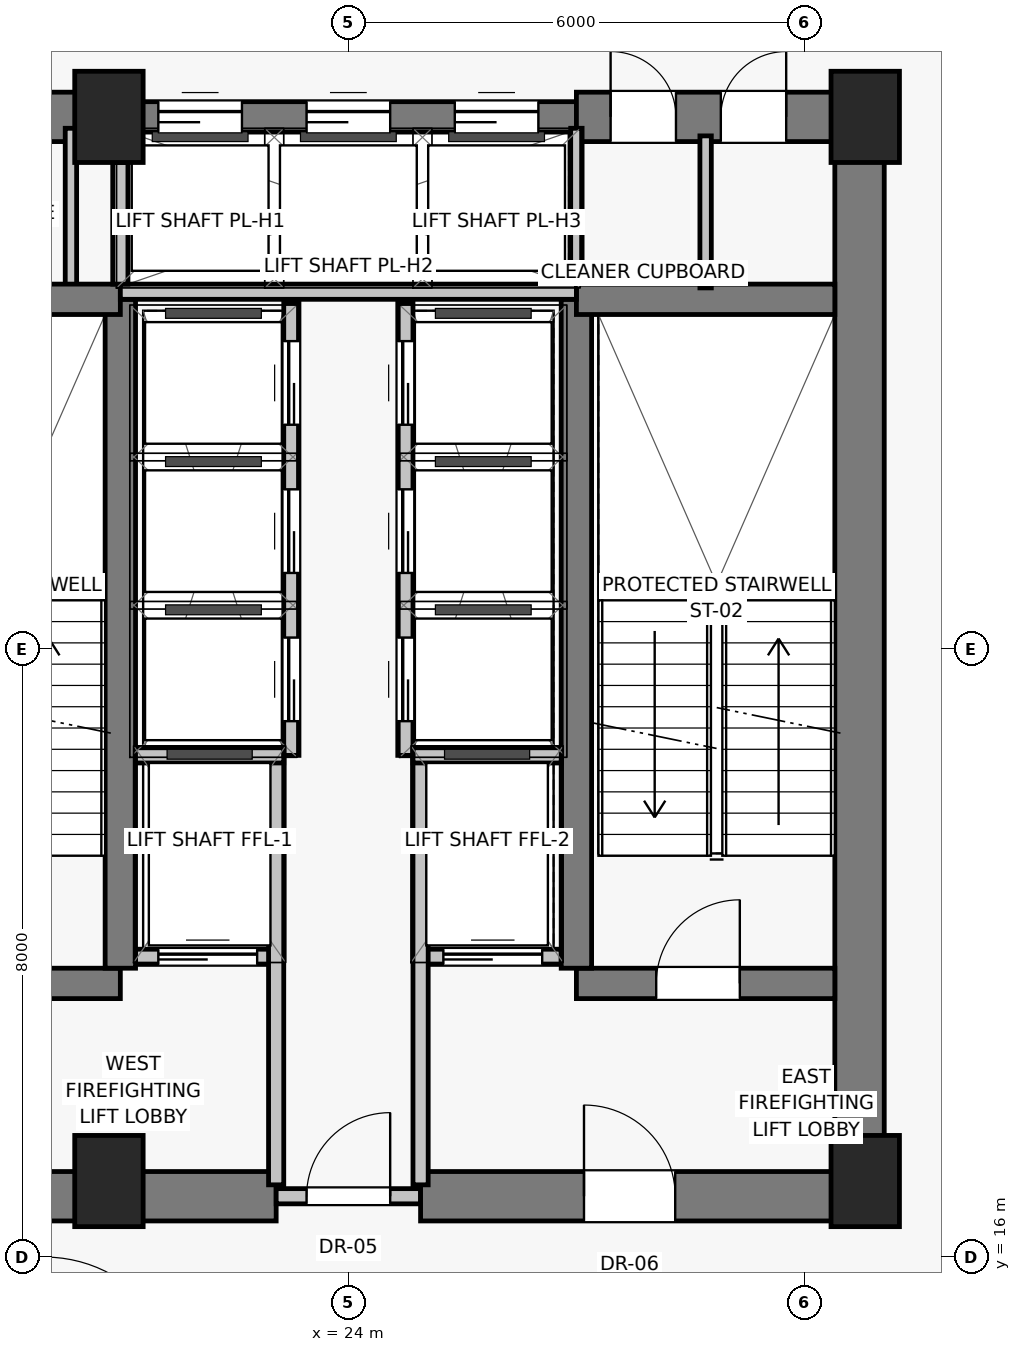
"""IFC4 building model, lengths in metres.
Left out: names, types, materials, properties, quantities, classifications, styles, units other than length and angle.
Written with IfcOpenShell. Run it as: python <this file> out.ifc"""

import sys

from ifc_helpers import new_model, si_unit, direction, frame, frame_2d, origin, origin_2d, place, context, subcontext, project, spatial, rectangle, extrude, source, transform, mapped, element, fill, save


model = new_model("IFC4")
c1 = context("Model", 3, precision=1e-05, world=origin(), true_north=direction((0.0, 1.0)))
c2 = subcontext(c1, "Body", "Model", "MODEL_VIEW")
j1 = project(units=[si_unit("LENGTHUNIT", "METRE"), si_unit("PLANEANGLEUNIT", "RADIAN")], contexts=[c1])
p1 = place(None, origin())
s1 = spatial("IfcSite", under=j1, at=p1, CompositionType="ELEMENT")
p2 = place(p1, origin())
s2 = spatial("IfcBuilding", under=s1, at=p2, CompositionType="ELEMENT")
p3 = place(p2, frame((0.0, 0.0, 85.15)))
s3 = spatial("IfcBuildingStorey", under=s2, at=p3, CompositionType="ELEMENT", Elevation=85.15)
for number, where, z_axis, x_axis in (
    (1, (20.85, 17.0, 0.0), (0.0, 0.0, 1.0), (1.0, 0.0, 0.0)),
    (2, (30.8, 17.0, 0.0), (0.0, 0.0, 1.0), (1.0, 0.0, 0.0)),
    (3, (20.85, 31.0, 0.0), (0.0, 0.0, 1.0), (1.0, 0.0, 0.0)),
    (4, (30.8, 31.0, 0.0), (0.0, 0.0, 1.0), (1.0, 0.0, 0.0)),
):
    element("IfcColumn", number, at=place(p3, frame(where, z_axis=z_axis, x_axis=x_axis)), inside=s3, PredefinedType="PILASTER", context=c2, shape_type="SweptSolid", body=[
        extrude(rectangle(XDim=0.9, YDim=1.2, at=origin_2d()), origin(), (0.0, 0.0, 1.0), 4.3),
    ])
p4 = place(p3, frame((30.725, 16.8, 0.0), z_axis=(0.0, 0.0, 1.0), x_axis=(0.0, 1.0, 0.0)))
e5 = element("IfcWall", 5, at=p4, inside=s3, PredefinedType="SHEAR", context=c2, shape_type="SweptSolid", body=[
    extrude(rectangle(XDim=14.2, YDim=0.65, at=frame_2d((7.1, 0.0))), origin(), (0.0, 0.0, 1.0), 4.05),
])
p5 = place(p3, frame((17.2, 16.8, 0.0), z_axis=(0.0, 0.0, 1.0), x_axis=(1.0, 0.0, 0.0)))
e6 = element("IfcWall", 6, at=p5, inside=s3, PredefinedType="SHEAR", context=c2, shape_type="SweptSolid", body=[
    extrude(rectangle(XDim=5.85, YDim=0.65, at=frame_2d((2.925, 0.0))), origin(), (0.0, 0.0, 1.0), 4.05),
])
p6 = place(p5, frame((1.15, 0.0, 0.0)))
e7 = element("IfcOpeningElement", 7, at=p6, cuts=e6, PredefinedType="OPENING", context=c2, shape_type="SweptSolid", body=[
    extrude(rectangle(XDim=1.2, YDim=2.03, at=frame_2d((0.6, 1.015))), frame((0.0, 0.335, 0.0), z_axis=(0.0, -1.0, 0.0), x_axis=(1.0, 0.0, 0.0)), (0.0, 0.0, 1.0), 0.67),
])
p7 = place(p3, frame((23.05, 16.8, 0.0), z_axis=(0.0, 0.0, 1.0), x_axis=(1.0, 0.0, 0.0)))
e8 = element("IfcWall", 8, at=p7, inside=s3, PredefinedType="SOLIDWALL", context=c2, shape_type="SweptSolid", body=[
    extrude(rectangle(XDim=1.9, YDim=0.2, at=frame_2d((0.95, 0.0))), origin(), (0.0, 0.0, 1.0), 3.2),
])
p8 = place(p7, frame((0.4, 0.0, 0.0)))
e9 = element("IfcOpeningElement", 9, at=p8, cuts=e8, PredefinedType="OPENING", context=c2, shape_type="SweptSolid", body=[
    extrude(rectangle(XDim=1.1, YDim=2.03, at=frame_2d((0.55, 1.015))), frame((0.0, 0.11, 0.0), z_axis=(0.0, -1.0, 0.0), x_axis=(1.0, 0.0, 0.0)), (0.0, 0.0, 1.0), 0.22),
])
p9 = place(p3, frame((24.95, 16.8, 0.0), z_axis=(0.0, 0.0, 1.0), x_axis=(1.0, 0.0, 0.0)))
e10 = element("IfcWall", 10, at=p9, inside=s3, PredefinedType="SHEAR", context=c2, shape_type="SweptSolid", body=[
    extrude(rectangle(XDim=5.85, YDim=0.65, at=frame_2d((2.925, 0.0))), origin(), (0.0, 0.0, 1.0), 4.05),
])
p10 = place(p9, frame((2.15, 0.0, 0.0)))
e11 = element("IfcOpeningElement", 11, at=p10, cuts=e10, PredefinedType="OPENING", context=c2, shape_type="SweptSolid", body=[
    extrude(rectangle(XDim=1.2, YDim=2.03, at=frame_2d((0.6, 1.015))), frame((0.0, 0.335, 0.0), z_axis=(0.0, -1.0, 0.0), x_axis=(1.0, 0.0, 0.0)), (0.0, 0.0, 1.0), 0.67),
])
p11 = place(p3, frame((17.2, 31.0, 0.0), z_axis=(0.0, 0.0, 1.0), x_axis=(1.0, 0.0, 0.0)))
e12 = element("IfcWall", 12, at=p11, inside=s3, PredefinedType="SHEAR", context=c2, shape_type="SweptSolid", body=[
    extrude(rectangle(XDim=3.8, YDim=0.65, at=frame_2d((1.9, 0.0))), origin(), (0.0, 0.0, 1.0), 4.05),
])
p12 = place(p11, frame((1.25, 0.0, 0.0)))
e13 = element("IfcOpeningElement", 13, at=p12, cuts=e12, PredefinedType="OPENING", context=c2, shape_type="SweptSolid", body=[
    extrude(rectangle(XDim=0.86, YDim=2.01, at=frame_2d((0.43, 1.005))), frame((0.0, 0.335, 0.0), z_axis=(0.0, -1.0, 0.0), x_axis=(1.0, 0.0, 0.0)), (0.0, 0.0, 1.0), 0.67),
])
p13 = place(p3, frame((21.0, 31.0, 0.0), z_axis=(0.0, 0.0, 1.0), x_axis=(1.0, 0.0, 0.0)))
e14 = element("IfcWall", 14, at=p13, inside=s3, PredefinedType="SHEAR", context=c2, shape_type="SweptSolid", body=[
    extrude(rectangle(XDim=6.0, YDim=0.4, at=frame_2d((3.0, 0.0))), origin(), (0.0, 0.0, 1.0), 4.05),
])
p14 = place(p13, frame((0.5, 0.0, 0.0)))
e15 = element("IfcOpeningElement", 15, at=p14, cuts=e14, PredefinedType="OPENING", context=c2, shape_type="SweptSolid", body=[
    extrude(rectangle(XDim=1.1, YDim=2.08, at=frame_2d((0.55, 1.04))), frame((0.0, 0.21, 0.0), z_axis=(0.0, -1.0, 0.0), x_axis=(1.0, 0.0, 0.0)), (0.0, 0.0, 1.0), 0.42),
])
p15 = place(p13, frame((2.45, 0.0, 0.0)))
e16 = element("IfcOpeningElement", 16, at=p15, cuts=e14, PredefinedType="OPENING", context=c2, shape_type="SweptSolid", body=[
    extrude(rectangle(XDim=1.1, YDim=2.08, at=frame_2d((0.55, 1.04))), frame((0.0, 0.21, 0.0), z_axis=(0.0, -1.0, 0.0), x_axis=(1.0, 0.0, 0.0)), (0.0, 0.0, 1.0), 0.42),
])
p16 = place(p13, frame((4.4, 0.0, 0.0)))
e17 = element("IfcOpeningElement", 17, at=p16, cuts=e14, PredefinedType="OPENING", context=c2, shape_type="SweptSolid", body=[
    extrude(rectangle(XDim=1.1, YDim=2.08, at=frame_2d((0.55, 1.04))), frame((0.0, 0.21, 0.0), z_axis=(0.0, -1.0, 0.0), x_axis=(1.0, 0.0, 0.0)), (0.0, 0.0, 1.0), 0.42),
])
p17 = place(p3, frame((27.0, 31.0, 0.0), z_axis=(0.0, 0.0, 1.0), x_axis=(1.0, 0.0, 0.0)))
e18 = element("IfcWall", 18, at=p17, inside=s3, PredefinedType="SHEAR", context=c2, shape_type="SweptSolid", body=[
    extrude(rectangle(XDim=3.8, YDim=0.65, at=frame_2d((1.9, 0.0))), origin(), (0.0, 0.0, 1.0), 4.05),
])
p18 = place(p17, frame((0.45, 0.0, 0.0)))
e19 = element("IfcOpeningElement", 19, at=p18, cuts=e18, PredefinedType="OPENING", context=c2, shape_type="SweptSolid", body=[
    extrude(rectangle(XDim=0.86, YDim=2.01, at=frame_2d((0.43, 1.005))), frame((0.0, 0.335, 0.0), z_axis=(0.0, -1.0, 0.0), x_axis=(1.0, 0.0, 0.0)), (0.0, 0.0, 1.0), 0.67),
])
p19 = place(p17, frame((1.9, 0.0, 0.0)))
e20 = element("IfcOpeningElement", 20, at=p19, cuts=e18, PredefinedType="OPENING", context=c2, shape_type="SweptSolid", body=[
    extrude(rectangle(XDim=0.86, YDim=2.01, at=frame_2d((0.43, 1.005))), frame((0.0, 0.335, 0.0), z_axis=(0.0, -1.0, 0.0), x_axis=(1.0, 0.0, 0.0)), (0.0, 0.0, 1.0), 0.67),
])
for number, where, z_axis, x_axis in (
    (21, (20.35, 28.65, 0.0), (0.0, 0.0, 1.0), (0.0, 1.0, 0.0)),
    (22, (27.0, 28.65, 0.0), (0.0, 0.0, 1.0), (0.0, 1.0, 0.0)),
):
    element("IfcWall", number, at=place(p3, frame(where, z_axis=z_axis, x_axis=x_axis)), inside=s3, PredefinedType="PARTITIONING", context=c2, shape_type="SweptSolid", body=[
        extrude(rectangle(XDim=2.2, YDim=0.15, at=frame_2d((1.1, 0.0))), origin(), (0.0, 0.0, 1.0), 4.05),
    ])
p20 = place(p3, frame((17.6, 19.6, 0.0), z_axis=(0.0, 0.0, 1.0), x_axis=(1.0, 0.0, 0.0)))
e23 = element("IfcWall", 23, at=p20, inside=s3, PredefinedType="SHEAR", context=c2, shape_type="SweptSolid", body=[
    extrude(rectangle(XDim=3.4, YDim=0.4, at=frame_2d((1.7, 0.0))), origin(), (0.0, 0.0, 1.0), 4.05),
])
p21 = place(p20, frame((1.05, 0.0, 0.0)))
e24 = element("IfcOpeningElement", 24, at=p21, cuts=e23, PredefinedType="OPENING", context=c2, shape_type="SweptSolid", body=[
    extrude(rectangle(XDim=1.1, YDim=2.03, at=frame_2d((0.55, 1.015))), frame((0.0, 0.21, 0.0), z_axis=(0.0, -1.0, 0.0), x_axis=(1.0, 0.0, 0.0)), (0.0, 0.0, 1.0), 0.42),
])
p22 = place(p3, frame((21.2, 19.95, 0.0), z_axis=(0.0, 0.0, 1.0), x_axis=(1.0, 0.0, 0.0)))
e25 = element("IfcWall", 25, at=p22, inside=s3, PredefinedType="SOLIDWALL", context=c2, shape_type="SweptSolid", body=[
    extrude(rectangle(XDim=1.85, YDim=0.2, at=frame_2d((0.925, 0.0))), origin(), (0.0, 0.0, 1.0), 4.05),
])
p23 = place(p22, frame((0.3, 0.0, 0.0)))
e26 = element("IfcOpeningElement", 26, at=p23, cuts=e25, PredefinedType="OPENING", context=c2, shape_type="SweptSolid", body=[
    extrude(rectangle(XDim=1.3, YDim=2.25, at=frame_2d((0.65, 1.125))), frame((0.0, 0.11, 0.0), z_axis=(0.0, -1.0, 0.0), x_axis=(1.0, 0.0, 0.0)), (0.0, 0.0, 1.0), 0.22),
])
p24 = place(p3, frame((24.95, 19.95, 0.0), z_axis=(0.0, 0.0, 1.0), x_axis=(1.0, 0.0, 0.0)))
e27 = element("IfcWall", 27, at=p24, inside=s3, PredefinedType="SOLIDWALL", context=c2, shape_type="SweptSolid", body=[
    extrude(rectangle(XDim=1.85, YDim=0.2, at=frame_2d((0.925, 0.0))), origin(), (0.0, 0.0, 1.0), 4.05),
])
p25 = place(p24, frame((0.3, 0.0, 0.0)))
e28 = element("IfcOpeningElement", 28, at=p25, cuts=e27, PredefinedType="OPENING", context=c2, shape_type="SweptSolid", body=[
    extrude(rectangle(XDim=1.3, YDim=2.25, at=frame_2d((0.65, 1.125))), frame((0.0, 0.11, 0.0), z_axis=(0.0, -1.0, 0.0), x_axis=(1.0, 0.0, 0.0)), (0.0, 0.0, 1.0), 0.22),
])
p26 = place(p3, frame((27.0, 19.6, 0.0), z_axis=(0.0, 0.0, 1.0), x_axis=(1.0, 0.0, 0.0)))
e29 = element("IfcWall", 29, at=p26, inside=s3, PredefinedType="SHEAR", context=c2, shape_type="SweptSolid", body=[
    extrude(rectangle(XDim=3.4, YDim=0.4, at=frame_2d((1.7, 0.0))), origin(), (0.0, 0.0, 1.0), 4.05),
])
p27 = place(p26, frame((1.05, 0.0, 0.0)))
e30 = element("IfcOpeningElement", 30, at=p27, cuts=e29, PredefinedType="OPENING", context=c2, shape_type="SweptSolid", body=[
    extrude(rectangle(XDim=1.1, YDim=2.03, at=frame_2d((0.55, 1.015))), frame((0.0, 0.21, 0.0), z_axis=(0.0, -1.0, 0.0), x_axis=(1.0, 0.0, 0.0)), (0.0, 0.0, 1.0), 0.42),
])
for number, where, z_axis, x_axis in (
    (31, (21.0, 19.8, 0.0), (0.0, 0.0, 1.0), (0.0, 1.0, 0.0)),
    (32, (27.0, 19.8, 0.0), (0.0, 0.0, 1.0), (0.0, 1.0, 0.0)),
):
    element("IfcWall", number, at=place(p3, frame(where, z_axis=z_axis, x_axis=x_axis)), inside=s3, PredefinedType="SHEAR", context=c2, shape_type="SweptSolid", body=[
        extrude(rectangle(XDim=8.8, YDim=0.4, at=frame_2d((4.4, 0.0))), origin(), (0.0, 0.0, 1.0), 4.05),
    ])
for number, where, z_axis, x_axis in (
    (33, (17.6, 28.6, 0.0), (0.0, 0.0, 1.0), (1.0, 0.0, 0.0)),
    (34, (27.0, 28.6, 0.0), (0.0, 0.0, 1.0), (1.0, 0.0, 0.0)),
):
    element("IfcWall", number, at=place(p3, frame(where, z_axis=z_axis, x_axis=x_axis)), inside=s3, PredefinedType="SHEAR", context=c2, shape_type="SweptSolid", body=[
        extrude(rectangle(XDim=3.4, YDim=0.4, at=frame_2d((1.7, 0.0))), origin(), (0.0, 0.0, 1.0), 4.05),
    ])
for number, where, z_axis, x_axis in (
    (35, (23.05, 16.95, 0.0), (0.0, 0.0, 1.0), (0.0, 1.0, 0.0)),
    (36, (24.95, 16.95, 0.0), (0.0, 0.0, 1.0), (0.0, 1.0, 0.0)),
):
    element("IfcWall", number, at=place(p3, frame(where, z_axis=z_axis, x_axis=x_axis)), inside=s3, PredefinedType="SOLIDWALL", context=c2, shape_type="SweptSolid", body=[
        extrude(rectangle(XDim=5.6, YDim=0.2, at=frame_2d((2.8, 0.0))), origin(), (0.0, 0.0, 1.0), 4.05),
    ])
for number, where, z_axis, x_axis in (
    (37, (21.2, 22.6, 0.0), (0.0, 0.0, 1.0), (1.0, 0.0, 0.0)),
    (38, (24.85, 22.6, 0.0), (0.0, 0.0, 1.0), (1.0, 0.0, 0.0)),
):
    element("IfcWall", number, at=place(p3, frame(where, z_axis=z_axis, x_axis=x_axis)), inside=s3, PredefinedType="SOLIDWALL", context=c2, shape_type="SweptSolid", body=[
        extrude(rectangle(XDim=1.95, YDim=0.2, at=frame_2d((0.975, 0.0))), origin(), (0.0, 0.0, 1.0), 4.05),
    ])
p28 = place(p3, frame((21.0, 28.7, 0.0), z_axis=(0.0, 0.0, 1.0), x_axis=(1.0, 0.0, 0.0)))
e39 = element("IfcWall", 39, at=p28, inside=s3, PredefinedType="SOLIDWALL", context=c2, shape_type="SweptSolid", body=[
    extrude(rectangle(XDim=6.0, YDim=0.2, at=frame_2d((3.0, 0.0))), origin(), (0.0, 0.0, 1.0), 4.05),
])
p29 = place(p3, frame((21.0, 28.8, 0.0), z_axis=(0.0, 0.0, 1.0), x_axis=(0.0, 1.0, 0.0)))
e40 = element("IfcWall", 40, at=p29, inside=s3, PredefinedType="SOLIDWALL", context=c2, shape_type="SweptSolid", body=[
    extrude(rectangle(XDim=1.6, YDim=0.2, at=frame_2d((0.8, 0.0))), origin(), (0.0, 0.0, 1.0), 4.05),
])
p30 = place(p3, frame((23.25, 22.6, 0.0), z_axis=(0.0, 0.0, 1.0), x_axis=(0.0, 1.0, 0.0)))
e41 = element("IfcWall", 41, at=p30, inside=s3, PredefinedType="SOLIDWALL", context=c2, shape_type="SweptSolid", body=[
    extrude(rectangle(XDim=5.95, YDim=0.2, at=frame_2d((2.975, 0.0))), origin(), (0.0, 0.0, 1.0), 4.05),
])
p31 = place(p30, frame((0.45, 0.0, 0.0)))
e42 = element("IfcOpeningElement", 42, at=p31, cuts=e41, PredefinedType="OPENING", context=c2, shape_type="SweptSolid", body=[
    extrude(rectangle(XDim=1.1, YDim=2.08, at=frame_2d((0.55, 1.04))), frame((0.0, 0.11, 0.0), z_axis=(0.0, -1.0, 0.0), x_axis=(1.0, 0.0, 0.0)), (0.0, 0.0, 1.0), 0.22),
])
p32 = place(p30, frame((2.4, 0.0, 0.0)))
e43 = element("IfcOpeningElement", 43, at=p32, cuts=e41, PredefinedType="OPENING", context=c2, shape_type="SweptSolid", body=[
    extrude(rectangle(XDim=1.1, YDim=2.08, at=frame_2d((0.55, 1.04))), frame((0.0, 0.11, 0.0), z_axis=(0.0, -1.0, 0.0), x_axis=(1.0, 0.0, 0.0)), (0.0, 0.0, 1.0), 0.22),
])
p33 = place(p30, frame((4.35, 0.0, 0.0)))
e44 = element("IfcOpeningElement", 44, at=p33, cuts=e41, PredefinedType="OPENING", context=c2, shape_type="SweptSolid", body=[
    extrude(rectangle(XDim=1.1, YDim=2.08, at=frame_2d((0.55, 1.04))), frame((0.0, 0.11, 0.0), z_axis=(0.0, -1.0, 0.0), x_axis=(1.0, 0.0, 0.0)), (0.0, 0.0, 1.0), 0.22),
])
p34 = place(p3, frame((24.75, 22.6, 0.0), z_axis=(0.0, 0.0, 1.0), x_axis=(0.0, 1.0, 0.0)))
e45 = element("IfcWall", 45, at=p34, inside=s3, PredefinedType="SOLIDWALL", context=c2, shape_type="SweptSolid", body=[
    extrude(rectangle(XDim=5.95, YDim=0.2, at=frame_2d((2.975, 0.0))), origin(), (0.0, 0.0, 1.0), 4.05),
])
p35 = place(p34, frame((0.45, 0.0, 0.0)))
e46 = element("IfcOpeningElement", 46, at=p35, cuts=e45, PredefinedType="OPENING", context=c2, shape_type="SweptSolid", body=[
    extrude(rectangle(XDim=1.1, YDim=2.08, at=frame_2d((0.55, 1.04))), frame((0.0, 0.11, 0.0), z_axis=(0.0, -1.0, 0.0), x_axis=(1.0, 0.0, 0.0)), (0.0, 0.0, 1.0), 0.22),
])
p36 = place(p34, frame((2.4, 0.0, 0.0)))
e47 = element("IfcOpeningElement", 47, at=p36, cuts=e45, PredefinedType="OPENING", context=c2, shape_type="SweptSolid", body=[
    extrude(rectangle(XDim=1.1, YDim=2.08, at=frame_2d((0.55, 1.04))), frame((0.0, 0.11, 0.0), z_axis=(0.0, -1.0, 0.0), x_axis=(1.0, 0.0, 0.0)), (0.0, 0.0, 1.0), 0.22),
])
p37 = place(p34, frame((4.35, 0.0, 0.0)))
e48 = element("IfcOpeningElement", 48, at=p37, cuts=e45, PredefinedType="OPENING", context=c2, shape_type="SweptSolid", body=[
    extrude(rectangle(XDim=1.1, YDim=2.08, at=frame_2d((0.55, 1.04))), frame((0.0, 0.11, 0.0), z_axis=(0.0, -1.0, 0.0), x_axis=(1.0, 0.0, 0.0)), (0.0, 0.0, 1.0), 0.22),
])
p38 = place(p3, frame((28.7, 28.75, 0.0), z_axis=(0.0, 0.0, 1.0), x_axis=(0.0, 1.0, 0.0)))
e49 = element("IfcWall", 49, at=p38, inside=s3, PredefinedType="PARTITIONING", context=c2, shape_type="SweptSolid", body=[
    extrude(rectangle(XDim=2.0, YDim=0.15, at=frame_2d((1.0, 0.0))), origin(), (0.0, 0.0, 1.0), 4.05),
])
m1 = source(origin(), c2, "Body", "SweptSolid", [
    extrude(rectangle(XDim=1.1, YDim=2.03, at=frame_2d((0.55, 1.015))), frame((0.0, 0.025, 0.0), z_axis=(0.0, -1.0, 0.0), x_axis=(1.0, 0.0, 0.0)), (0.0, 0.0, 1.0), 0.05),
])
p39 = place(p8, origin())
e50 = element("IfcDoor", 50, at=p39, inside=s3, OperationType="SINGLE_SWING_RIGHT", PredefinedType="DOOR", context=c2, shape_type="MappedRepresentation", body=[
    mapped(m1, transform((0.0, 0.0, 0.0), scale=1.0)),
])
fill(e9, e50)
m2 = source(origin(), c2, "Body", "SweptSolid", [
    extrude(rectangle(XDim=1.2, YDim=2.03, at=frame_2d((0.6, 1.015))), frame((0.0, 0.025, 0.0), z_axis=(0.0, -1.0, 0.0), x_axis=(1.0, 0.0, 0.0)), (0.0, 0.0, 1.0), 0.05),
])
p40 = place(p10, origin())
e51 = element("IfcDoor", 51, at=p40, inside=s3, OperationType="SINGLE_SWING_LEFT", PredefinedType="DOOR", context=c2, shape_type="MappedRepresentation", body=[
    mapped(m2, transform((0.0, 0.0, 0.0), scale=1.0)),
])
fill(e11, e51)
m3 = source(origin(), c2, "Body", "SweptSolid", [
    extrude(rectangle(XDim=1.1, YDim=2.08, at=frame_2d((0.55, 1.04))), frame((0.0, 0.025, 0.0), z_axis=(0.0, -1.0, 0.0), x_axis=(1.0, 0.0, 0.0)), (0.0, 0.0, 1.0), 0.05),
])
p41 = place(p14, origin())
e52 = element("IfcDoor", 52, at=p41, inside=s3, OperationType="SLIDING_TO_LEFT", PredefinedType="DOOR", context=c2, shape_type="MappedRepresentation", body=[
    mapped(m3, transform((0.0, 0.0, 0.0), scale=1.0)),
])
fill(e15, e52)
p42 = place(p15, origin())
e53 = element("IfcDoor", 53, at=p42, inside=s3, OperationType="SLIDING_TO_LEFT", PredefinedType="DOOR", context=c2, shape_type="MappedRepresentation", body=[
    mapped(m3, transform((0.0, 0.0, 0.0), scale=1.0)),
])
fill(e16, e53)
p43 = place(p16, origin())
e54 = element("IfcDoor", 54, at=p43, inside=s3, OperationType="SLIDING_TO_LEFT", PredefinedType="DOOR", context=c2, shape_type="MappedRepresentation", body=[
    mapped(m3, transform((0.0, 0.0, 0.0), scale=1.0)),
])
fill(e17, e54)
m4 = source(origin(), c2, "Body", "SweptSolid", [
    extrude(rectangle(XDim=0.86, YDim=2.01, at=frame_2d((0.43, 1.005))), frame((0.0, 0.025, 0.0), z_axis=(0.0, -1.0, 0.0), x_axis=(1.0, 0.0, 0.0)), (0.0, 0.0, 1.0), 0.05),
])
p44 = place(p18, origin())
e55 = element("IfcDoor", 55, at=p44, inside=s3, OperationType="SINGLE_SWING_LEFT", PredefinedType="DOOR", context=c2, shape_type="MappedRepresentation", body=[
    mapped(m4, transform((0.0, 0.0, 0.0), scale=1.0)),
])
fill(e19, e55)
p45 = place(p19, origin())
e56 = element("IfcDoor", 56, at=p45, inside=s3, OperationType="SINGLE_SWING_RIGHT", PredefinedType="DOOR", context=c2, shape_type="MappedRepresentation", body=[
    mapped(m4, transform((0.0, 0.0, 0.0), scale=1.0)),
])
fill(e20, e56)
m5 = source(origin(), c2, "Body", "SweptSolid", [
    extrude(rectangle(XDim=1.3, YDim=2.25, at=frame_2d((0.65, 1.125))), frame((0.0, 0.025, 0.0), z_axis=(0.0, -1.0, 0.0), x_axis=(1.0, 0.0, 0.0)), (0.0, 0.0, 1.0), 0.05),
])
p46 = place(p23, origin())
e57 = element("IfcDoor", 57, at=p46, inside=s3, OperationType="SLIDING_TO_LEFT", PredefinedType="DOOR", context=c2, shape_type="MappedRepresentation", body=[
    mapped(m5, transform((0.0, 0.0, 0.0), scale=1.0)),
])
fill(e26, e57)
p47 = place(p25, origin())
e58 = element("IfcDoor", 58, at=p47, inside=s3, OperationType="SLIDING_TO_LEFT", PredefinedType="DOOR", context=c2, shape_type="MappedRepresentation", body=[
    mapped(m5, transform((0.0, 0.0, 0.0), scale=1.0)),
])
fill(e28, e58)
p48 = place(p27, origin())
e59 = element("IfcDoor", 59, at=p48, inside=s3, OperationType="SINGLE_SWING_RIGHT", PredefinedType="DOOR", context=c2, shape_type="MappedRepresentation", body=[
    mapped(m1, transform((0.0, 0.0, 0.0), scale=1.0)),
])
fill(e30, e59)
p49 = place(p31, origin())
e60 = element("IfcDoor", 60, at=p49, inside=s3, OperationType="SLIDING_TO_LEFT", PredefinedType="DOOR", context=c2, shape_type="MappedRepresentation", body=[
    mapped(m3, transform((0.0, 0.0, 0.0), scale=1.0)),
])
fill(e42, e60)
p50 = place(p32, origin())
e61 = element("IfcDoor", 61, at=p50, inside=s3, OperationType="SLIDING_TO_LEFT", PredefinedType="DOOR", context=c2, shape_type="MappedRepresentation", body=[
    mapped(m3, transform((0.0, 0.0, 0.0), scale=1.0)),
])
fill(e43, e61)
p51 = place(p33, origin())
e62 = element("IfcDoor", 62, at=p51, inside=s3, OperationType="SLIDING_TO_LEFT", PredefinedType="DOOR", context=c2, shape_type="MappedRepresentation", body=[
    mapped(m3, transform((0.0, 0.0, 0.0), scale=1.0)),
])
fill(e44, e62)
p52 = place(p35, origin())
e63 = element("IfcDoor", 63, at=p52, inside=s3, OperationType="SLIDING_TO_LEFT", PredefinedType="DOOR", context=c2, shape_type="MappedRepresentation", body=[
    mapped(m3, transform((0.0, 0.0, 0.0), scale=1.0)),
])
fill(e46, e63)
p53 = place(p36, origin())
e64 = element("IfcDoor", 64, at=p53, inside=s3, OperationType="SLIDING_TO_LEFT", PredefinedType="DOOR", context=c2, shape_type="MappedRepresentation", body=[
    mapped(m3, transform((0.0, 0.0, 0.0), scale=1.0)),
])
fill(e47, e64)
p54 = place(p37, origin())
e65 = element("IfcDoor", 65, at=p54, inside=s3, OperationType="SLIDING_TO_LEFT", PredefinedType="DOOR", context=c2, shape_type="MappedRepresentation", body=[
    mapped(m3, transform((0.0, 0.0, 0.0), scale=1.0)),
])
fill(e48, e65)
save(model, sys.argv[1])
